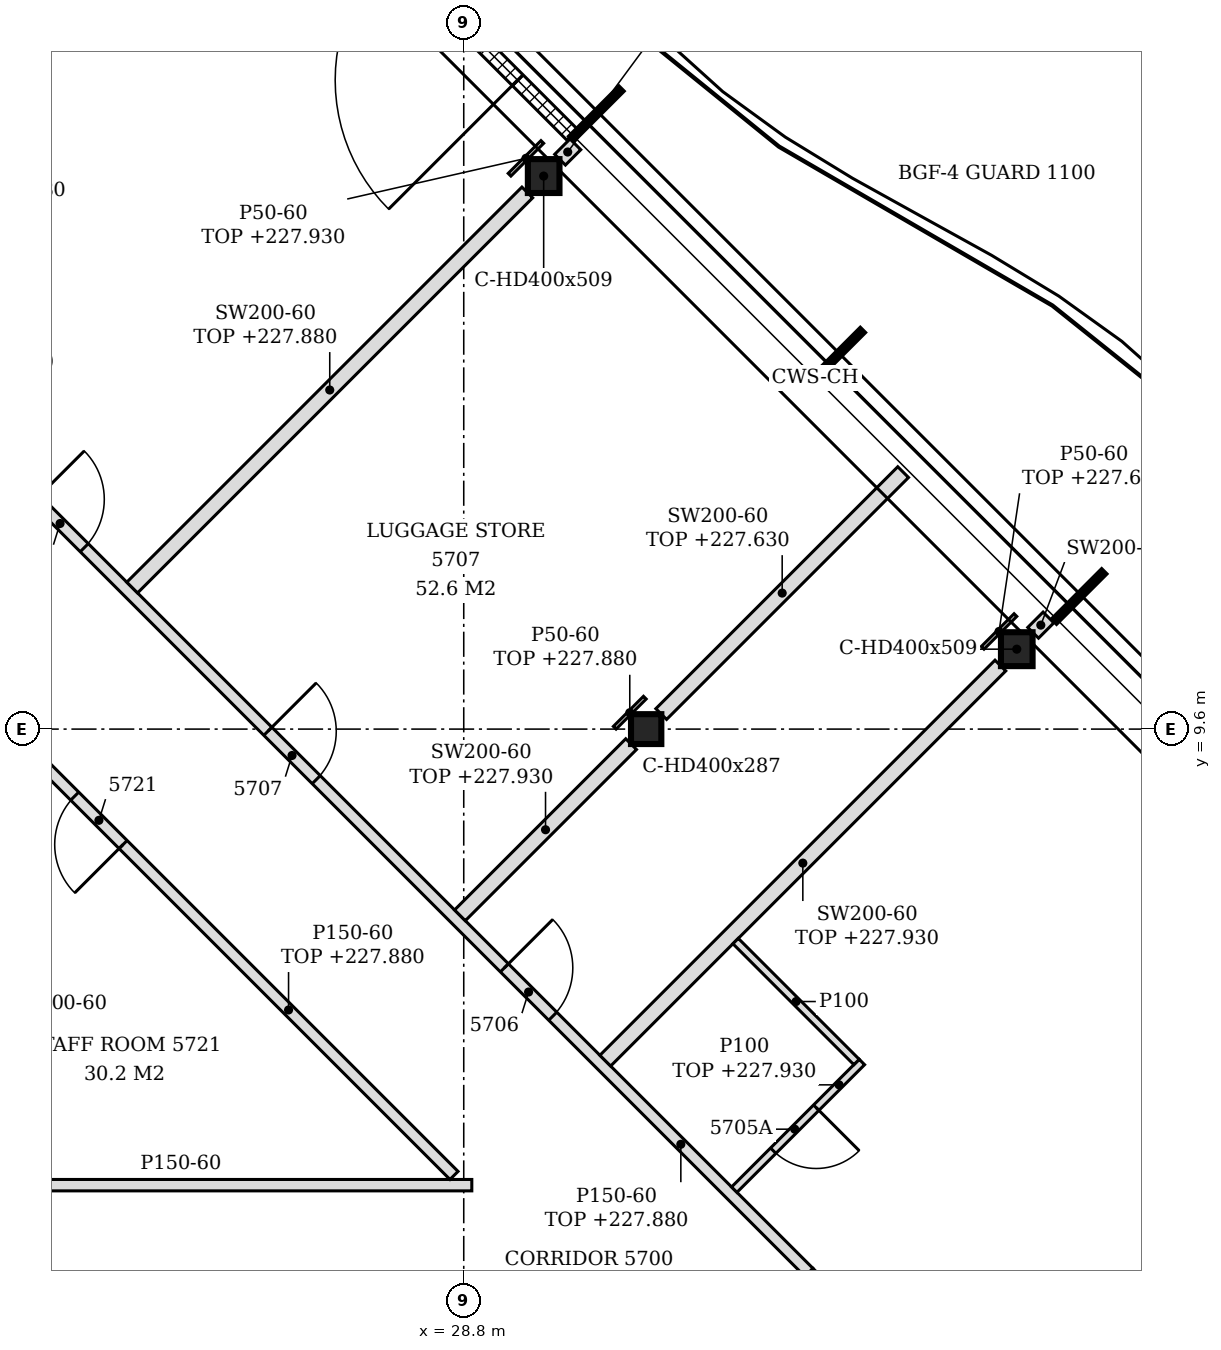
"""IFC4 building model, lengths in metres.
Left out: names, types, materials, properties, quantities, classifications, styles, units other than length and angle.
Written with IfcOpenShell. Run it as: python <this file> out.ifc"""

import sys

from ifc_helpers import new_model, si_unit, direction, frame, frame_2d, origin, origin_2d, place, context, subcontext, project, spatial, polyline, rectangle, i_section, outline, extrude, element, fill, save


model = new_model("IFC4")
c1 = context("Model", 3, precision=1e-05, world=origin(), true_north=direction((0.0, 1.0)))
c2 = subcontext(c1, "Body", "Model", "MODEL_VIEW")
j1 = project(units=[si_unit("LENGTHUNIT", "METRE"), si_unit("PLANEANGLEUNIT", "RADIAN")], contexts=[c1])
p1 = place(None, origin())
s1 = spatial("IfcSite", under=j1, at=p1, CompositionType="ELEMENT")
p2 = place(p1, origin())
s2 = spatial("IfcBuilding", under=s1, at=p2, CompositionType="ELEMENT")
p3 = place(p2, frame((0.0, 0.0, 225.0)))
s3 = spatial("IfcBuildingStorey", under=s2, at=p3, CompositionType="ELEMENT", Elevation=225.0)
for number, where, z_axis, x_axis in (
    (1, (36.076, 10.652, -0.15), (0.0, 0.0, 1.0), (1.0, 0.0, 0.0)),
    (2, (29.852, 16.876, -0.15), (0.0, 0.0, 1.0), (1.0, 0.0, 0.0)),
):
    element("IfcColumn", number, at=place(p3, frame(where, z_axis=z_axis, x_axis=x_axis)), inside=s3, PredefinedType="COLUMN", context=c2, shape_type="SweptSolid", body=[
        extrude(i_section(OverallWidth=0.416, OverallDepth=0.446, WebThickness=0.039, FlangeThickness=0.063, FilletRadius=0.015, at=origin_2d()), origin(), (0.0, 0.0, 1.0), 3.6),
    ])
p4 = place(p3, frame((31.2, 9.6, -0.15), z_axis=(0.0, 0.0, 1.0), x_axis=(1.0, 0.0, 0.0)))
e3 = element("IfcColumn", 3, at=p4, inside=s3, PredefinedType="COLUMN", context=c2, shape_type="SweptSolid", body=[
    extrude(i_section(OverallWidth=0.399, OverallDepth=0.393, WebThickness=0.023, FlangeThickness=0.037, FilletRadius=0.015, at=origin_2d()), origin(), (0.0, 0.0, 1.0), 3.6),
])
p5 = place(p3, frame((30.226, 17.42, 0.0), z_axis=(0.0, 0.0, 1.0), x_axis=(-0.707079231393, 0.707134329907, 0.0)))
e4 = element("IfcWall", 4, at=p5, inside=s3, PredefinedType="NOTDEFINED", context=c2, shape_type="SweptSolid", body=[
    extrude(rectangle(XDim=4.431, YDim=0.2, at=frame_2d((2.215, 0.0))), origin(), (0.0, 0.0, 1.0), 3.45),
])
p6 = place(p5, frame((1.015, 0.0, 0.0)))
e5 = element("IfcOpeningElement", 5, at=p6, cuts=e4, PredefinedType="OPENING", context=c2, shape_type="SweptSolid", body=[
    extrude(rectangle(XDim=2.4, YDim=2.4, at=frame_2d((1.2, 1.2))), frame((0.0, 0.11, 0.0), z_axis=(0.0, -1.0, 0.0), x_axis=(1.0, 0.0, 0.0)), (0.0, 0.0, 1.0), 0.22),
])
p7 = place(p3, frame((31.295, 0.301, 0.0), z_axis=(0.0, 0.0, 1.0), x_axis=(0.707146890479, 0.707066669618, 0.0)))
e6 = element("IfcWall", 6, at=p7, inside=s3, PredefinedType="PARTITIONING", context=c2, shape_type="SweptSolid", body=[
    extrude(rectangle(XDim=3.043, YDim=0.15, at=frame_2d((1.522, 0.0))), origin(), (0.0, 0.0, 1.0), 2.93),
])
p8 = place(p7, frame((0.895, 0.0, 0.0)))
e7 = element("IfcOpeningElement", 7, at=p8, cuts=e6, PredefinedType="OPENING", context=c2, shape_type="SweptSolid", body=[
    extrude(rectangle(XDim=0.9, YDim=2.1, at=frame_2d((0.45, 1.05))), frame((0.0, 0.085, 0.0), z_axis=(0.0, -1.0, 0.0), x_axis=(1.0, 0.0, 0.0)), (0.0, 0.0, 1.0), 0.17),
])
p9 = place(p3, frame((33.341, 2.453, 0.0), z_axis=(0.0, 0.0, 1.0), x_axis=(-0.707098652635, 0.707114909645, 0.0)))
e8 = element("IfcWall", 8, at=p9, inside=s3, PredefinedType="PARTITIONING", context=c2, shape_type="SweptSolid", body=[
    extrude(rectangle(XDim=15.018, YDim=0.15, at=frame_2d((7.509, 0.0))), origin(), (0.0, 0.0, 1.0), 2.88),
])
p10 = place(p9, frame((4.766, 0.0, 0.0)))
e9 = element("IfcOpeningElement", 9, at=p10, cuts=e8, PredefinedType="OPENING", context=c2, shape_type="SweptSolid", body=[
    extrude(rectangle(XDim=0.9, YDim=2.1, at=frame_2d((0.45, 1.05))), frame((0.0, 0.085, 0.0), z_axis=(0.0, -1.0, 0.0), x_axis=(1.0, 0.0, 0.0)), (0.0, 0.0, 1.0), 0.17),
])
p11 = place(p9, frame((9.167, 0.0, 0.0)))
e10 = element("IfcOpeningElement", 10, at=p11, cuts=e8, PredefinedType="OPENING", context=c2, shape_type="SweptSolid", body=[
    extrude(rectangle(XDim=0.9, YDim=2.1, at=frame_2d((0.45, 1.05))), frame((0.0, 0.085, 0.0), z_axis=(0.0, -1.0, 0.0), x_axis=(1.0, 0.0, 0.0)), (0.0, 0.0, 1.0), 0.17),
])
p12 = place(p9, frame((13.482, 0.0, 0.0)))
e11 = element("IfcOpeningElement", 11, at=p12, cuts=e8, PredefinedType="OPENING", context=c2, shape_type="SweptSolid", body=[
    extrude(rectangle(XDim=0.9, YDim=2.1, at=frame_2d((0.45, 1.05))), frame((0.0, 0.085, 0.0), z_axis=(0.0, -1.0, 0.0), x_axis=(1.0, 0.0, 0.0)), (0.0, 0.0, 1.0), 0.17),
])
p13 = place(p3, frame((32.359, 3.541, 0.0), z_axis=(0.0, 0.0, 1.0), x_axis=(0.707158179099, 0.707055379538, 0.0)))
e12 = element("IfcWall", 12, at=p13, inside=s3, PredefinedType="PARTITIONING", context=c2, shape_type="SweptSolid", body=[
    extrude(rectangle(XDim=2.375, YDim=0.1, at=frame_2d((1.188, 0.0))), origin(), (0.0, 0.0, 1.0), 2.93),
])
p14 = place(p13, frame((0.725, 0.0, 0.0)))
e13 = element("IfcOpeningElement", 13, at=p14, cuts=e12, PredefinedType="OPENING", context=c2, shape_type="SweptSolid", body=[
    extrude(rectangle(XDim=0.8, YDim=2.1, at=frame_2d((0.4, 1.05))), frame((0.0, 0.06, 0.0), z_axis=(0.0, -1.0, 0.0), x_axis=(1.0, 0.0, 0.0)), (0.0, 0.0, 1.0), 0.12),
])
p15 = place(p3, frame((19.125, 3.6, 0.0), z_axis=(0.0, 0.0, 1.0), x_axis=(1.0, 0.0, 0.0)))
e14 = element("IfcWall", 14, at=p15, inside=s3, PredefinedType="PARTITIONING", context=c2, shape_type="SweptSolid", body=[
    extrude(outline(polyline([(0.0, 0.0), (9.781, 0.0), (9.781, 3.45), (0.225, 3.45), (0.223, 2.83), (0.0, 2.83), (0.0, 0.0)])), frame((0.0, 0.075, 0.0), z_axis=(0.0, -1.0, 0.0), x_axis=(1.0, 0.0, 0.0)), (0.0, 0.0, 1.0), 0.15),
])
p16 = place(p15, frame((1.325, 0.0, 0.0)))
e15 = element("IfcOpeningElement", 15, at=p16, cuts=e14, PredefinedType="OPENING", context=c2, shape_type="SweptSolid", body=[
    extrude(rectangle(XDim=0.8, YDim=2.1, at=frame_2d((0.4, 1.05))), frame((0.0, 0.085, 0.0), z_axis=(0.0, -1.0, 0.0), x_axis=(1.0, 0.0, 0.0)), (0.0, 0.0, 1.0), 0.17),
])
p17 = place(p3, frame((28.672, 3.728, 0.0), z_axis=(0.0, 0.0, 1.0), x_axis=(-0.707116088468, 0.707097473782, 0.0)))
e16 = element("IfcWall", 16, at=p17, inside=s3, PredefinedType="PARTITIONING", context=c2, shape_type="SweptSolid", body=[
    extrude(rectangle(XDim=13.115, YDim=0.15, at=frame_2d((6.558, 0.0))), origin(), (0.0, 0.0, 1.0), 2.88),
])
p18 = place(p17, frame((6.157, 0.0, 0.0)))
e17 = element("IfcOpeningElement", 17, at=p18, cuts=e16, PredefinedType="OPENING", context=c2, shape_type="SweptSolid", body=[
    extrude(rectangle(XDim=0.9, YDim=2.1, at=frame_2d((0.45, 1.05))), frame((0.0, 0.085, 0.0), z_axis=(0.0, -1.0, 0.0), x_axis=(1.0, 0.0, 0.0)), (0.0, 0.0, 1.0), 0.17),
])
p19 = place(p3, frame((30.662, 5.238, 0.0), z_axis=(0.0, 0.0, 1.0), x_axis=(0.707106781187, 0.707106781187, 0.0)))
e18 = element("IfcWall", 18, at=p19, inside=s3, PredefinedType="PARTITIONING", context=c2, shape_type="SweptSolid", body=[
    extrude(rectangle(XDim=7.351, YDim=0.2, at=frame_2d((3.676, 0.0))), origin(), (0.0, 0.0, 1.0), 2.93),
])
p20 = place(p3, frame((33.968, 5.22, 0.0), z_axis=(0.0, 0.0, 1.0), x_axis=(-0.707106781187, 0.707106781187, 0.0)))
e19 = element("IfcWall", 19, at=p20, inside=s3, PredefinedType="PARTITIONING", context=c2, shape_type="SweptSolid", body=[
    extrude(rectangle(XDim=2.25, YDim=0.1, at=frame_2d((1.125, 0.0))), origin(), (0.0, 0.0, 1.0), 3.45),
])
p21 = place(p3, frame((28.75, 7.15, 0.0), z_axis=(0.0, 0.0, 1.0), x_axis=(0.7070684525, 0.707145107796, 0.0)))
e20 = element("IfcWall", 20, at=p21, inside=s3, PredefinedType="PARTITIONING", context=c2, shape_type="SweptSolid", body=[
    extrude(rectangle(XDim=3.185, YDim=0.2, at=frame_2d((1.592, 0.0))), origin(), (0.0, 0.0, 1.0), 2.93),
])
p22 = place(p3, frame((31.398, 9.798, 0.0), z_axis=(0.0, 0.0, 1.0), x_axis=(0.707133900936, 0.707079660397, 0.0)))
e21 = element("IfcWall", 21, at=p22, inside=s3, PredefinedType="PARTITIONING", context=c2, shape_type="SweptSolid", body=[
    extrude(rectangle(XDim=4.501, YDim=0.2, at=frame_2d((2.25, 0.0))), origin(), (0.0, 0.0, 1.0), 2.63),
])
p23 = place(p3, frame((36.291, 10.867, 0.0), z_axis=(0.0, 0.0, 1.0), x_axis=(0.707534423513, 0.706678880075, 0.0)))
e22 = element("IfcWall", 22, at=p23, inside=s3, PredefinedType="PARTITIONING", context=c2, shape_type="SweptSolid", body=[
    extrude(rectangle(XDim=0.285, YDim=0.2, at=frame_2d((0.143, 0.0))), origin(), (0.0, 0.0, 1.0), 3.45),
])
p24 = place(p3, frame((24.438, 11.462, 0.0), z_axis=(0.0, 0.0, 1.0), x_axis=(0.707090175614, 0.707123386369, 0.0)))
e23 = element("IfcWall", 23, at=p24, inside=s3, PredefinedType="PARTITIONING", context=c2, shape_type="SweptSolid", body=[
    extrude(rectangle(XDim=7.351, YDim=0.2, at=frame_2d((3.676, 0.0))), origin(), (0.0, 0.0, 1.0), 2.88),
])
p25 = place(p3, frame((30.067, 17.091, 0.0), z_axis=(0.0, 0.0, 1.0), x_axis=(0.707106781187, 0.707106781187, 0.0)))
e24 = element("IfcWall", 24, at=p25, inside=s3, PredefinedType="PARTITIONING", context=c2, shape_type="SweptSolid", body=[
    extrude(rectangle(XDim=0.285, YDim=0.2, at=frame_2d((0.143, 0.0))), origin(), (0.0, 0.0, 1.0), 3.45),
])
p26 = place(p3, frame((35.627, 10.669, 0.0), z_axis=(0.0, 0.0, 1.0), x_axis=(0.707307009627, 0.706906496032, 0.0)))
e25 = element("IfcWall", 25, at=p26, inside=s3, PredefinedType="PARTITIONING", context=c2, shape_type="SweptSolid", body=[
    extrude(rectangle(XDim=0.61, YDim=0.05, at=frame_2d((0.305, 0.0))), origin(), (0.0, 0.0, 1.0), 2.63),
])
p27 = place(p3, frame((30.786, 9.618, 0.0), z_axis=(0.0, 0.0, 1.0), x_axis=(0.707106781187, 0.707106781187, 0.0)))
e26 = element("IfcWall", 26, at=p27, inside=s3, PredefinedType="PARTITIONING", context=c2, shape_type="SweptSolid", body=[
    extrude(rectangle(XDim=0.56, YDim=0.05, at=frame_2d((0.28, 0.0))), origin(), (0.0, 0.0, 1.0), 2.88),
])
p28 = place(p3, frame((29.403, 16.893, 0.0), z_axis=(0.0, 0.0, 1.0), x_axis=(0.706906496032, 0.707307009627, 0.0)))
e27 = element("IfcWall", 27, at=p28, inside=s3, PredefinedType="PARTITIONING", context=c2, shape_type="SweptSolid", body=[
    extrude(rectangle(XDim=0.61, YDim=0.05, at=frame_2d((0.305, 0.0))), origin(), (0.0, 0.0, 1.0), 2.93),
])
p29 = place(p6, origin())
e28 = element("IfcDoor", 28, at=p29, inside=s3, OperationType="SINGLE_SWING_LEFT", PredefinedType="DOOR", context=c2, shape_type="SweptSolid", body=[
    extrude(rectangle(XDim=2.4, YDim=2.4, at=frame_2d((1.2, 1.2))), frame((0.0, 0.025, 0.0), z_axis=(0.0, -1.0, 0.0), x_axis=(1.0, 0.0, 0.0)), (0.0, 0.0, 1.0), 0.05),
])
fill(e5, e28)
p30 = place(p14, frame((0.8, 0.0, 0.0), z_axis=(0.0, 0.0, 1.0), x_axis=(-1.0, 0.0, 0.0)))
e29 = element("IfcDoor", 29, at=p30, inside=s3, OperationType="SINGLE_SWING_LEFT", PredefinedType="DOOR", context=c2, shape_type="SweptSolid", body=[
    extrude(rectangle(XDim=0.8, YDim=2.1, at=frame_2d((0.4, 1.05))), frame((0.0, 0.025, 0.0), z_axis=(0.0, -1.0, 0.0), x_axis=(1.0, 0.0, 0.0)), (0.0, 0.0, 1.0), 0.05),
])
fill(e13, e29)
p31 = place(p10, frame((0.9, 0.0, 0.0), z_axis=(0.0, 0.0, 1.0), x_axis=(-1.0, 0.0, 0.0)))
e30 = element("IfcDoor", 30, at=p31, inside=s3, OperationType="SINGLE_SWING_LEFT", PredefinedType="DOOR", context=c2, shape_type="SweptSolid", body=[
    extrude(rectangle(XDim=0.9, YDim=2.1, at=frame_2d((0.45, 1.05))), frame((0.0, 0.025, 0.0), z_axis=(0.0, -1.0, 0.0), x_axis=(1.0, 0.0, 0.0)), (0.0, 0.0, 1.0), 0.05),
])
fill(e9, e30)
p32 = place(p11, frame((0.9, 0.0, 0.0), z_axis=(0.0, 0.0, 1.0), x_axis=(-1.0, 0.0, 0.0)))
e31 = element("IfcDoor", 31, at=p32, inside=s3, OperationType="SINGLE_SWING_LEFT", PredefinedType="DOOR", context=c2, shape_type="SweptSolid", body=[
    extrude(rectangle(XDim=0.9, YDim=2.1, at=frame_2d((0.45, 1.05))), frame((0.0, 0.025, 0.0), z_axis=(0.0, -1.0, 0.0), x_axis=(1.0, 0.0, 0.0)), (0.0, 0.0, 1.0), 0.05),
])
fill(e10, e31)
p33 = place(p12, frame((0.9, 0.0, 0.0), z_axis=(0.0, 0.0, 1.0), x_axis=(-1.0, 0.0, 0.0)))
e32 = element("IfcDoor", 32, at=p33, inside=s3, OperationType="SINGLE_SWING_LEFT", PredefinedType="DOOR", context=c2, shape_type="SweptSolid", body=[
    extrude(rectangle(XDim=0.9, YDim=2.1, at=frame_2d((0.45, 1.05))), frame((0.0, 0.025, 0.0), z_axis=(0.0, -1.0, 0.0), x_axis=(1.0, 0.0, 0.0)), (0.0, 0.0, 1.0), 0.05),
])
fill(e11, e32)
p34 = place(p18, origin())
e33 = element("IfcDoor", 33, at=p34, inside=s3, OperationType="SINGLE_SWING_LEFT", PredefinedType="DOOR", context=c2, shape_type="SweptSolid", body=[
    extrude(rectangle(XDim=0.9, YDim=2.1, at=frame_2d((0.45, 1.05))), frame((0.0, 0.025, 0.0), z_axis=(0.0, -1.0, 0.0), x_axis=(1.0, 0.0, 0.0)), (0.0, 0.0, 1.0), 0.05),
])
fill(e17, e33)
save(model, sys.argv[1])
